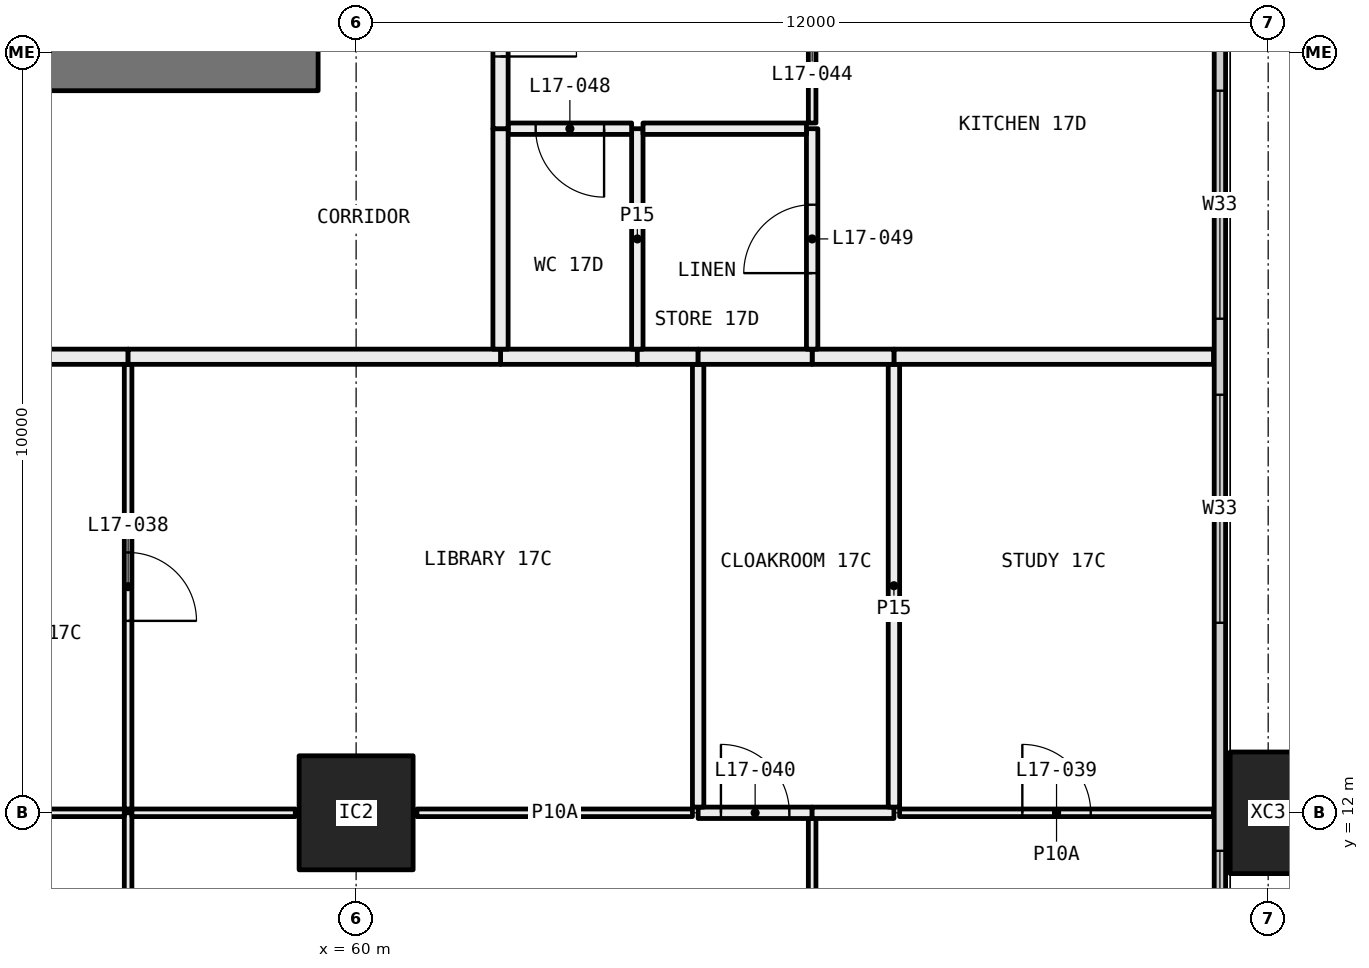
"""IFC4 building model, lengths in metres.
Left out: names, types, materials, properties, quantities, classifications, styles, units other than length and angle.
Written with IfcOpenShell. Run it as: python <this file> out.ifc"""

import sys

from ifc_helpers import new_model, si_unit, direction, frame, frame_2d, origin, origin_2d, place, context, subcontext, project, spatial, rectangle, hollow_rectangle, extrude, element, fill, save


model = new_model("IFC4")
c1 = context("Model", 3, precision=1e-05, world=origin(), true_north=direction((0.0, 1.0)))
c2 = subcontext(c1, "Body", "Model", "MODEL_VIEW")
j1 = project(units=[si_unit("LENGTHUNIT", "METRE"), si_unit("PLANEANGLEUNIT", "RADIAN")], contexts=[c1])
p1 = place(None, origin())
s1 = spatial("IfcSite", under=j1, at=p1, CompositionType="ELEMENT")
p2 = place(p1, origin())
s2 = spatial("IfcBuilding", under=s1, at=p2, CompositionType="ELEMENT")
p3 = place(p2, frame((0.0, 0.0, 71.4)))
s3 = spatial("IfcBuildingStorey", under=s2, at=p3, CompositionType="ELEMENT", Elevation=71.4)
p4 = place(p3, frame((60.0, 12.0, 0.0), z_axis=(0.0, 0.0, 1.0), x_axis=(1.0, 0.0, 0.0)))
e1 = element("IfcColumn", 1, at=p4, inside=s3, PredefinedType="COLUMN", context=c2, shape_type="SweptSolid", body=[
    extrude(hollow_rectangle(XDim=1.5, YDim=1.5, WallThickness=0.065, at=origin_2d()), origin(), (0.0, 0.0, 1.0), 3.05),
])
p5 = place(p3, frame((72.0, 12.0, -0.4), z_axis=(0.0, 0.0, 1.0), x_axis=(0.0, 1.0, 0.0)))
e2 = element("IfcColumn", 2, at=p5, inside=s3, PredefinedType="COLUMN", context=c2, shape_type="SweptSolid", body=[
    extrude(hollow_rectangle(XDim=1.6, YDim=1.0, WallThickness=0.065, at=origin_2d()), origin(), (0.0, 0.0, 1.0), 3.45),
])
p6 = place(p3, frame((71.365, 6.71, 0.0), z_axis=(0.0, 0.0, 1.0), x_axis=(0.0, 1.0, 0.0)))
e3 = element("IfcWall", 3, at=p6, inside=s3, PredefinedType="ELEMENTEDWALL", context=c2, shape_type="SweptSolid", body=[
    extrude(rectangle(XDim=34.58, YDim=0.15, at=frame_2d((17.29, 0.0))), origin(), (0.0, 0.0, 1.0), 3.05),
])
p7 = place(p6, frame((0.29, 0.0, 0.45)))
e4 = element("IfcOpeningElement", 4, at=p7, cuts=e3, PredefinedType="OPENING", context=c2, shape_type="SweptSolid", body=[
    extrude(rectangle(XDim=4.5, YDim=2.55, at=frame_2d((2.25, 1.275))), frame((0.0, 0.085, 0.0), z_axis=(0.0, -1.0, 0.0), x_axis=(1.0, 0.0, 0.0)), (0.0, 0.0, 1.0), 0.17),
])
p8 = place(p6, frame((7.79, 0.0, 0.45)))
e5 = element("IfcOpeningElement", 5, at=p8, cuts=e3, PredefinedType="OPENING", context=c2, shape_type="SweptSolid", body=[
    extrude(rectangle(XDim=3.0, YDim=2.55, at=frame_2d((1.5, 1.275))), frame((0.0, 0.085, 0.0), z_axis=(0.0, -1.0, 0.0), x_axis=(1.0, 0.0, 0.0)), (0.0, 0.0, 1.0), 0.17),
])
p9 = place(p6, frame((11.79, 0.0, 0.45)))
e6 = element("IfcOpeningElement", 6, at=p9, cuts=e3, PredefinedType="OPENING", context=c2, shape_type="SweptSolid", body=[
    extrude(rectangle(XDim=3.0, YDim=2.55, at=frame_2d((1.5, 1.275))), frame((0.0, 0.085, 0.0), z_axis=(0.0, -1.0, 0.0), x_axis=(1.0, 0.0, 0.0)), (0.0, 0.0, 1.0), 0.17),
])
p10 = place(p6, frame((19.79, 0.0, 0.45)))
e7 = element("IfcOpeningElement", 7, at=p10, cuts=e3, PredefinedType="OPENING", context=c2, shape_type="SweptSolid", body=[
    extrude(rectangle(XDim=3.0, YDim=2.55, at=frame_2d((1.5, 1.275))), frame((0.0, 0.085, 0.0), z_axis=(0.0, -1.0, 0.0), x_axis=(1.0, 0.0, 0.0)), (0.0, 0.0, 1.0), 0.17),
])
p11 = place(p6, frame((23.79, 0.0, 0.45)))
e8 = element("IfcOpeningElement", 8, at=p11, cuts=e3, PredefinedType="OPENING", context=c2, shape_type="SweptSolid", body=[
    extrude(rectangle(XDim=2.0, YDim=2.55, at=frame_2d((1.0, 1.275))), frame((0.0, 0.085, 0.0), z_axis=(0.0, -1.0, 0.0), x_axis=(1.0, 0.0, 0.0)), (0.0, 0.0, 1.0), 0.17),
])
p12 = place(p6, frame((29.79, 0.0, 0.45)))
e9 = element("IfcOpeningElement", 9, at=p12, cuts=e3, PredefinedType="OPENING", context=c2, shape_type="SweptSolid", body=[
    extrude(rectangle(XDim=4.5, YDim=2.55, at=frame_2d((2.25, 1.275))), frame((0.0, 0.085, 0.0), z_axis=(0.0, -1.0, 0.0), x_axis=(1.0, 0.0, 0.0)), (0.0, 0.0, 1.0), 0.17),
])
p13 = place(p3, frame((57.0, 6.05, 0.0), z_axis=(0.0, 0.0, 1.0), x_axis=(0.0, 1.0, 0.0)))
e10 = element("IfcWall", 10, at=p13, inside=s3, PredefinedType="PARTITIONING", context=c2, shape_type="SweptSolid", body=[
    extrude(rectangle(XDim=5.95, YDim=0.1, at=frame_2d((2.975, 0.0))), origin(), (0.0, 0.0, 1.0), 2.45),
])
p14 = place(p13, frame((2.525, 0.0, 0.0)))
e11 = element("IfcOpeningElement", 11, at=p14, cuts=e10, PredefinedType="OPENING", context=c2, shape_type="SweptSolid", body=[
    extrude(rectangle(XDim=0.9, YDim=2.1, at=frame_2d((0.45, 1.05))), frame((0.0, 0.06, 0.0), z_axis=(0.0, -1.0, 0.0), x_axis=(1.0, 0.0, 0.0)), (0.0, 0.0, 1.0), 0.12),
])
p15 = place(p3, frame((56.95, 12.0, 0.0), z_axis=(0.0, 0.0, 1.0), x_axis=(-1.0, 0.0, 0.0)))
e12 = element("IfcWall", 12, at=p15, inside=s3, PredefinedType="PARTITIONING", context=c2, shape_type="SweptSolid", body=[
    extrude(rectangle(XDim=4.45, YDim=0.1, at=frame_2d((2.225, 0.0))), origin(), (0.0, 0.0, 1.0), 2.45),
])
p16 = place(p15, frame((1.775, 0.0, 0.0)))
e13 = element("IfcOpeningElement", 13, at=p16, cuts=e12, PredefinedType="OPENING", context=c2, shape_type="SweptSolid", body=[
    extrude(rectangle(XDim=0.9, YDim=2.1, at=frame_2d((0.45, 1.05))), frame((0.0, 0.06, 0.0), z_axis=(0.0, -1.0, 0.0), x_axis=(1.0, 0.0, 0.0)), (0.0, 0.0, 1.0), 0.12),
])
p17 = place(p3, frame((66.0, 6.72, 0.0), z_axis=(0.0, 0.0, 1.0), x_axis=(0.0, 1.0, 0.0)))
e14 = element("IfcWall", 14, at=p17, inside=s3, PredefinedType="PARTITIONING", context=c2, shape_type="SweptSolid", body=[
    extrude(rectangle(XDim=5.205, YDim=0.1, at=frame_2d((2.603, 0.0))), origin(), (0.0, 0.0, 1.0), 2.45),
])
p18 = place(p17, frame((2.153, 0.0, 0.0)))
e15 = element("IfcOpeningElement", 15, at=p18, cuts=e14, PredefinedType="OPENING", context=c2, shape_type="SweptSolid", body=[
    extrude(rectangle(XDim=0.9, YDim=2.1, at=frame_2d((0.45, 1.05))), frame((0.0, 0.06, 0.0), z_axis=(0.0, -1.0, 0.0), x_axis=(1.0, 0.0, 0.0)), (0.0, 0.0, 1.0), 0.12),
])
p19 = place(p3, frame((59.2, 12.0, 0.0), z_axis=(0.0, 0.0, 1.0), x_axis=(-1.0, 0.0, 0.0)))
e16 = element("IfcWall", 16, at=p19, inside=s3, PredefinedType="PARTITIONING", context=c2, shape_type="SweptSolid", body=[
    extrude(rectangle(XDim=2.15, YDim=0.1, at=frame_2d((1.075, 0.0))), origin(), (0.0, 0.0, 1.0), 2.45),
])
p20 = place(p3, frame((64.425, 12.0, 0.0), z_axis=(0.0, 0.0, 1.0), x_axis=(-1.0, 0.0, 0.0)))
e17 = element("IfcWall", 17, at=p20, inside=s3, PredefinedType="PARTITIONING", context=c2, shape_type="SweptSolid", body=[
    extrude(rectangle(XDim=3.625, YDim=0.1, at=frame_2d((1.812, 0.0))), origin(), (0.0, 0.0, 1.0), 2.45),
])
p21 = place(p3, frame((66.0, 12.0, 0.0), z_axis=(0.0, 0.0, 1.0), x_axis=(-1.0, 0.0, 0.0)))
e18 = element("IfcWall", 18, at=p21, inside=s3, PredefinedType="PARTITIONING", context=c2, shape_type="SweptSolid", body=[
    extrude(rectangle(XDim=1.5, YDim=0.15, at=frame_2d((0.75, 0.0))), origin(), (0.0, 0.0, 1.0), 2.45),
])
p22 = place(p21, frame((0.3, 0.0, 0.0)))
e19 = element("IfcOpeningElement", 19, at=p22, cuts=e18, PredefinedType="OPENING", context=c2, shape_type="SweptSolid", body=[
    extrude(rectangle(XDim=0.9, YDim=2.1, at=frame_2d((0.45, 1.05))), frame((0.0, 0.085, 0.0), z_axis=(0.0, -1.0, 0.0), x_axis=(1.0, 0.0, 0.0)), (0.0, 0.0, 1.0), 0.17),
])
p23 = place(p3, frame((71.28, 12.0, 0.0), z_axis=(0.0, 0.0, 1.0), x_axis=(-1.0, 0.0, 0.0)))
e20 = element("IfcWall", 20, at=p23, inside=s3, PredefinedType="PARTITIONING", context=c2, shape_type="SweptSolid", body=[
    extrude(rectangle(XDim=4.129, YDim=0.1, at=frame_2d((2.064, 0.0))), origin(), (0.0, 0.0, 1.0), 2.45),
])
p24 = place(p23, frame((1.615, 0.0, 0.0)))
e21 = element("IfcOpeningElement", 21, at=p24, cuts=e20, PredefinedType="OPENING", context=c2, shape_type="SweptSolid", body=[
    extrude(rectangle(XDim=0.9, YDim=2.1, at=frame_2d((0.45, 1.05))), frame((0.0, 0.06, 0.0), z_axis=(0.0, -1.0, 0.0), x_axis=(1.0, 0.0, 0.0)), (0.0, 0.0, 1.0), 0.12),
])
p25 = place(p3, frame((67.076, 12.0, 0.0), z_axis=(0.0, 0.0, 1.0), x_axis=(-1.0, 0.0, 0.0)))
e22 = element("IfcWall", 22, at=p25, inside=s3, PredefinedType="PARTITIONING", context=c2, shape_type="SweptSolid", body=[
    extrude(rectangle(XDim=1.076, YDim=0.15, at=frame_2d((0.538, 0.0))), origin(), (0.0, 0.0, 1.0), 2.45),
])
p26 = place(p3, frame((57.0, 12.05, 0.0), z_axis=(0.0, 0.0, 1.0), x_axis=(0.0, 1.0, 0.0)))
e23 = element("IfcWall", 23, at=p26, inside=s3, PredefinedType="PARTITIONING", context=c2, shape_type="SweptSolid", body=[
    extrude(rectangle(XDim=5.85, YDim=0.1, at=frame_2d((2.925, 0.0))), origin(), (0.0, 0.0, 1.0), 2.45),
])
p27 = place(p26, frame((2.475, 0.0, 0.0)))
e24 = element("IfcOpeningElement", 24, at=p27, cuts=e23, PredefinedType="OPENING", context=c2, shape_type="SweptSolid", body=[
    extrude(rectangle(XDim=0.9, YDim=2.1, at=frame_2d((0.45, 1.05))), frame((0.0, 0.06, 0.0), z_axis=(0.0, -1.0, 0.0), x_axis=(1.0, 0.0, 0.0)), (0.0, 0.0, 1.0), 0.12),
])
p28 = place(p3, frame((57.0, 18.0, 0.0), z_axis=(0.0, 0.0, 1.0), x_axis=(-1.0, 0.0, 0.0)))
e25 = element("IfcWall", 25, at=p28, inside=s3, PredefinedType="PARTITIONING", context=c2, shape_type="SweptSolid", body=[
    extrude(rectangle(XDim=4.5, YDim=0.2, at=frame_2d((2.25, 0.0))), origin(), (0.0, 0.0, 1.0), 3.05),
])
p29 = place(p28, frame((1.75, 0.0, 0.0)))
e26 = element("IfcOpeningElement", 26, at=p29, cuts=e25, PredefinedType="OPENING", context=c2, shape_type="SweptSolid", body=[
    extrude(rectangle(XDim=1.0, YDim=2.1, at=frame_2d((0.5, 1.05))), frame((0.0, 0.11, 0.0), z_axis=(0.0, -1.0, 0.0), x_axis=(1.0, 0.0, 0.0)), (0.0, 0.0, 1.0), 0.22),
])
p30 = place(p3, frame((64.5, 12.075, 0.0), z_axis=(0.0, 0.0, 1.0), x_axis=(0.0, 1.0, 0.0)))
e27 = element("IfcWall", 27, at=p30, inside=s3, PredefinedType="PARTITIONING", context=c2, shape_type="SweptSolid", body=[
    extrude(rectangle(XDim=5.825, YDim=0.15, at=frame_2d((2.913, 0.0))), origin(), (0.0, 0.0, 1.0), 2.45),
])
p31 = place(p3, frame((63.7, 18.0, 0.0), z_axis=(0.0, 0.0, 1.0), x_axis=(-1.0, 0.0, 0.0)))
e28 = element("IfcWall", 28, at=p31, inside=s3, PredefinedType="PARTITIONING", context=c2, shape_type="SweptSolid", body=[
    extrude(rectangle(XDim=1.8, YDim=0.2, at=frame_2d((0.9, 0.0))), origin(), (0.0, 0.0, 1.0), 3.05),
])
p32 = place(p3, frame((64.5, 18.0, 0.0), z_axis=(0.0, 0.0, 1.0), x_axis=(-1.0, 0.0, 0.0)))
e29 = element("IfcWall", 29, at=p32, inside=s3, PredefinedType="PARTITIONING", context=c2, shape_type="SweptSolid", body=[
    extrude(rectangle(XDim=0.8, YDim=0.2, at=frame_2d((0.4, 0.0))), origin(), (0.0, 0.0, 1.0), 3.05),
])
p33 = place(p3, frame((61.9, 18.0, 0.0), z_axis=(0.0, 0.0, 1.0), x_axis=(-1.0, 0.0, 0.0)))
e30 = element("IfcWall", 30, at=p33, inside=s3, PredefinedType="PARTITIONING", context=c2, shape_type="SweptSolid", body=[
    extrude(rectangle(XDim=4.9, YDim=0.2, at=frame_2d((2.45, 0.0))), origin(), (0.0, 0.0, 1.0), 3.05),
])
p34 = place(p3, frame((67.076, 17.9, 0.0), z_axis=(0.0, 0.0, 1.0), x_axis=(0.0, -1.0, 0.0)))
e31 = element("IfcWall", 31, at=p34, inside=s3, PredefinedType="PARTITIONING", context=c2, shape_type="SweptSolid", body=[
    extrude(rectangle(XDim=5.825, YDim=0.15, at=frame_2d((2.913, 0.0))), origin(), (0.0, 0.0, 1.0), 2.45),
])
p35 = place(p3, frame((71.28, 18.0, 0.0), z_axis=(0.0, 0.0, 1.0), x_axis=(-1.0, 0.0, 0.0)))
e32 = element("IfcWall", 32, at=p35, inside=s3, PredefinedType="PARTITIONING", context=c2, shape_type="SweptSolid", body=[
    extrude(rectangle(XDim=4.204, YDim=0.2, at=frame_2d((2.102, 0.0))), origin(), (0.0, 0.0, 1.0), 3.05),
])
p36 = place(p3, frame((67.076, 18.0, 0.0), z_axis=(0.0, 0.0, 1.0), x_axis=(-1.0, 0.0, 0.0)))
e33 = element("IfcWall", 33, at=p36, inside=s3, PredefinedType="PARTITIONING", context=c2, shape_type="SweptSolid", body=[
    extrude(rectangle(XDim=1.076, YDim=0.2, at=frame_2d((0.538, 0.0))), origin(), (0.0, 0.0, 1.0), 3.05),
])
p37 = place(p3, frame((66.0, 18.0, 0.0), z_axis=(0.0, 0.0, 1.0), x_axis=(-1.0, 0.0, 0.0)))
e34 = element("IfcWall", 34, at=p37, inside=s3, PredefinedType="PARTITIONING", context=c2, shape_type="SweptSolid", body=[
    extrude(rectangle(XDim=1.5, YDim=0.2, at=frame_2d((0.75, 0.0))), origin(), (0.0, 0.0, 1.0), 3.05),
])
p38 = place(p3, frame((66.0, 21.0, 0.0), z_axis=(0.0, 0.0, 1.0), x_axis=(0.0, -1.0, 0.0)))
e35 = element("IfcWall", 35, at=p38, inside=s3, PredefinedType="PARTITIONING", context=c2, shape_type="SweptSolid", body=[
    extrude(rectangle(XDim=2.9, YDim=0.15, at=frame_2d((1.45, 0.0))), origin(), (0.0, 0.0, 1.0), 3.05),
])
p39 = place(p38, frame((1.0, 0.0, 0.0)))
e36 = element("IfcOpeningElement", 36, at=p39, cuts=e35, PredefinedType="OPENING", context=c2, shape_type="SweptSolid", body=[
    extrude(rectangle(XDim=0.9, YDim=2.1, at=frame_2d((0.45, 1.05))), frame((0.0, 0.085, 0.0), z_axis=(0.0, -1.0, 0.0), x_axis=(1.0, 0.0, 0.0)), (0.0, 0.0, 1.0), 0.17),
])
p40 = place(p3, frame((66.0, 23.95, 0.0), z_axis=(0.0, 0.0, 1.0), x_axis=(0.0, -1.0, 0.0)))
e37 = element("IfcWall", 37, at=p40, inside=s3, PredefinedType="PARTITIONING", context=c2, shape_type="SweptSolid", body=[
    extrude(rectangle(XDim=2.875, YDim=0.1, at=frame_2d((1.438, 0.0))), origin(), (0.0, 0.0, 1.0), 2.45),
])
p41 = place(p40, frame((0.988, 0.0, 0.0)))
e38 = element("IfcOpeningElement", 38, at=p41, cuts=e37, PredefinedType="OPENING", context=c2, shape_type="SweptSolid", body=[
    extrude(rectangle(XDim=0.9, YDim=2.1, at=frame_2d((0.45, 1.05))), frame((0.0, 0.06, 0.0), z_axis=(0.0, -1.0, 0.0), x_axis=(1.0, 0.0, 0.0)), (0.0, 0.0, 1.0), 0.12),
])
p42 = place(p3, frame((63.7, 18.1, 0.0), z_axis=(0.0, 0.0, 1.0), x_axis=(0.0, 1.0, 0.0)))
e39 = element("IfcWall", 39, at=p42, inside=s3, PredefinedType="PARTITIONING", context=c2, shape_type="SweptSolid", body=[
    extrude(rectangle(XDim=2.9, YDim=0.15, at=frame_2d((1.45, 0.0))), origin(), (0.0, 0.0, 1.0), 3.05),
])
p43 = place(p3, frame((63.625, 21.0, 0.0), z_axis=(0.0, 0.0, 1.0), x_axis=(-1.0, 0.0, 0.0)))
e40 = element("IfcWall", 40, at=p43, inside=s3, PredefinedType="PARTITIONING", context=c2, shape_type="SweptSolid", body=[
    extrude(rectangle(XDim=1.625, YDim=0.15, at=frame_2d((0.812, 0.0))), origin(), (0.0, 0.0, 1.0), 3.05),
])
p44 = place(p43, frame((0.363, 0.0, 0.0)))
e41 = element("IfcOpeningElement", 41, at=p44, cuts=e40, PredefinedType="OPENING", context=c2, shape_type="SweptSolid", body=[
    extrude(rectangle(XDim=0.9, YDim=2.1, at=frame_2d((0.45, 1.05))), frame((0.0, 0.085, 0.0), z_axis=(0.0, -1.0, 0.0), x_axis=(1.0, 0.0, 0.0)), (0.0, 0.0, 1.0), 0.17),
])
p45 = place(p3, frame((61.9, 21.0, 0.0), z_axis=(0.0, 0.0, 1.0), x_axis=(0.0, -1.0, 0.0)))
e42 = element("IfcWall", 42, at=p45, inside=s3, PredefinedType="PARTITIONING", context=c2, shape_type="SweptSolid", body=[
    extrude(rectangle(XDim=2.9, YDim=0.2, at=frame_2d((1.45, 0.0))), origin(), (0.0, 0.0, 1.0), 3.05),
])
p46 = place(p3, frame((65.925, 21.0, 0.0), z_axis=(0.0, 0.0, 1.0), x_axis=(-1.0, 0.0, 0.0)))
e43 = element("IfcWall", 43, at=p46, inside=s3, PredefinedType="PARTITIONING", context=c2, shape_type="SweptSolid", body=[
    extrude(rectangle(XDim=2.15, YDim=0.15, at=frame_2d((1.075, 0.0))), origin(), (0.0, 0.0, 1.0), 3.05),
])
p47 = place(p3, frame((61.9, 23.9, 0.0), z_axis=(0.0, 0.0, 1.0), x_axis=(0.0, -1.0, 0.0)))
e44 = element("IfcWall", 44, at=p47, inside=s3, PredefinedType="PARTITIONING", context=c2, shape_type="SweptSolid", body=[
    extrude(rectangle(XDim=2.9, YDim=0.2, at=frame_2d((1.45, 0.0))), origin(), (0.0, 0.0, 1.0), 3.05),
])
p48 = place(p47, frame((0.95, 0.0, 0.0)))
e45 = element("IfcOpeningElement", 45, at=p48, cuts=e44, PredefinedType="OPENING", context=c2, shape_type="SweptSolid", body=[
    extrude(rectangle(XDim=1.0, YDim=2.1, at=frame_2d((0.5, 1.05))), frame((0.0, 0.11, 0.0), z_axis=(0.0, -1.0, 0.0), x_axis=(1.0, 0.0, 0.0)), (0.0, 0.0, 1.0), 0.22),
])
p49 = place(p3, frame((59.5, 21.9, 0.0), z_axis=(0.0, 0.0, 1.0), x_axis=(-1.0, 0.0, 0.0)))
e46 = element("IfcWall", 46, at=p49, inside=s3, PredefinedType="SHEAR", context=c2, shape_type="SweptSolid", body=[
    extrude(rectangle(XDim=11.0, YDim=0.8, at=frame_2d((5.5, 0.0))), origin(), (0.0, 0.0, 1.0), 3.05),
])
p50 = place(p7, origin())
e47 = element("IfcWindow", 47, at=p50, inside=s3, PartitioningType="SINGLE_PANEL", PredefinedType="WINDOW", context=c2, shape_type="SweptSolid", body=[
    extrude(rectangle(XDim=4.5, YDim=2.55, at=frame_2d((2.25, 1.275))), frame((0.0, 0.03, 0.0), z_axis=(0.0, -1.0, 0.0), x_axis=(1.0, 0.0, 0.0)), (0.0, 0.0, 1.0), 0.06),
])
fill(e4, e47)
p51 = place(p8, origin())
e48 = element("IfcWindow", 48, at=p51, inside=s3, PartitioningType="SINGLE_PANEL", PredefinedType="WINDOW", context=c2, shape_type="SweptSolid", body=[
    extrude(rectangle(XDim=3.0, YDim=2.55, at=frame_2d((1.5, 1.275))), frame((0.0, 0.03, 0.0), z_axis=(0.0, -1.0, 0.0), x_axis=(1.0, 0.0, 0.0)), (0.0, 0.0, 1.0), 0.06),
])
fill(e5, e48)
p52 = place(p9, origin())
e49 = element("IfcWindow", 49, at=p52, inside=s3, PartitioningType="SINGLE_PANEL", PredefinedType="WINDOW", context=c2, shape_type="SweptSolid", body=[
    extrude(rectangle(XDim=3.0, YDim=2.55, at=frame_2d((1.5, 1.275))), frame((0.0, 0.03, 0.0), z_axis=(0.0, -1.0, 0.0), x_axis=(1.0, 0.0, 0.0)), (0.0, 0.0, 1.0), 0.06),
])
fill(e6, e49)
p53 = place(p27, frame((0.9, 0.0, 0.0), x_axis=(-1.0, 0.0, 0.0)))
e50 = element("IfcDoor", 50, at=p53, inside=s3, OperationType="SINGLE_SWING_LEFT", PredefinedType="DOOR", context=c2, shape_type="SweptSolid", body=[
    extrude(rectangle(XDim=0.9, YDim=2.1, at=frame_2d((0.45, 1.05))), frame((0.0, 0.025, 0.0), z_axis=(0.0, -1.0, 0.0), x_axis=(1.0, 0.0, 0.0)), (0.0, 0.0, 1.0), 0.05),
])
fill(e24, e50)
p54 = place(p24, frame((0.9, 0.0, 0.0), x_axis=(-1.0, 0.0, 0.0)))
e51 = element("IfcDoor", 51, at=p54, inside=s3, OperationType="SINGLE_SWING_RIGHT", PredefinedType="DOOR", context=c2, shape_type="SweptSolid", body=[
    extrude(rectangle(XDim=0.9, YDim=2.1, at=frame_2d((0.45, 1.05))), frame((0.0, 0.025, 0.0), z_axis=(0.0, -1.0, 0.0), x_axis=(1.0, 0.0, 0.0)), (0.0, 0.0, 1.0), 0.05),
])
fill(e21, e51)
p55 = place(p22, frame((0.9, 0.0, 0.0), x_axis=(-1.0, 0.0, 0.0)))
e52 = element("IfcDoor", 52, at=p55, inside=s3, OperationType="SINGLE_SWING_RIGHT", PredefinedType="DOOR", context=c2, shape_type="SweptSolid", body=[
    extrude(rectangle(XDim=0.9, YDim=2.1, at=frame_2d((0.45, 1.05))), frame((0.0, 0.025, 0.0), z_axis=(0.0, -1.0, 0.0), x_axis=(1.0, 0.0, 0.0)), (0.0, 0.0, 1.0), 0.05),
])
fill(e19, e52)
p56 = place(p48, origin())
e53 = element("IfcDoor", 53, at=p56, inside=s3, OperationType="SINGLE_SWING_LEFT", PredefinedType="DOOR", context=c2, shape_type="SweptSolid", body=[
    extrude(rectangle(XDim=1.0, YDim=2.1, at=frame_2d((0.5, 1.05))), frame((0.0, 0.025, 0.0), z_axis=(0.0, -1.0, 0.0), x_axis=(1.0, 0.0, 0.0)), (0.0, 0.0, 1.0), 0.05),
])
fill(e45, e53)
p57 = place(p44, origin())
e54 = element("IfcDoor", 54, at=p57, inside=s3, OperationType="SINGLE_SWING_RIGHT", PredefinedType="DOOR", context=c2, shape_type="SweptSolid", body=[
    extrude(rectangle(XDim=0.9, YDim=2.1, at=frame_2d((0.45, 1.05))), frame((0.0, 0.025, 0.0), z_axis=(0.0, -1.0, 0.0), x_axis=(1.0, 0.0, 0.0)), (0.0, 0.0, 1.0), 0.05),
])
fill(e41, e54)
p58 = place(p39, frame((0.9, 0.0, 0.0), x_axis=(-1.0, 0.0, 0.0)))
e55 = element("IfcDoor", 55, at=p58, inside=s3, OperationType="SINGLE_SWING_RIGHT", PredefinedType="DOOR", context=c2, shape_type="SweptSolid", body=[
    extrude(rectangle(XDim=0.9, YDim=2.1, at=frame_2d((0.45, 1.05))), frame((0.0, 0.025, 0.0), z_axis=(0.0, -1.0, 0.0), x_axis=(1.0, 0.0, 0.0)), (0.0, 0.0, 1.0), 0.05),
])
fill(e36, e55)
save(model, sys.argv[1])
